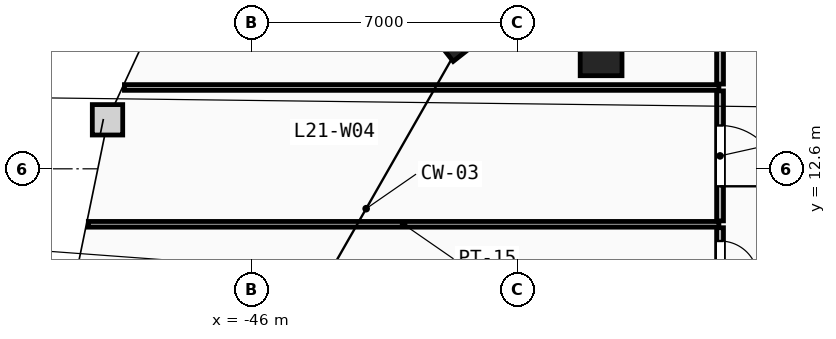
"""IFC4 building model, lengths in metres.
Left out: names, types, materials, properties, quantities, classifications, styles, units other than length and angle.
Written with IfcOpenShell. Run it as: python <this file> out.ifc"""

import sys

from ifc_helpers import new_model, si_unit, direction, frame, frame_2d, origin, origin_2d, place, context, subcontext, project, spatial, rectangle, extrude, element, fill, save


model = new_model("IFC4")
c1 = context("Model", 3, precision=1e-05, world=origin(), true_north=direction((0.0, 1.0)))
c2 = subcontext(c1, "Body", "Model", "MODEL_VIEW")
j1 = project(units=[si_unit("LENGTHUNIT", "METRE"), si_unit("PLANEANGLEUNIT", "RADIAN")], contexts=[c1])
p1 = place(None, origin())
s1 = spatial("IfcSite", under=j1, at=p1, CompositionType="ELEMENT")
p2 = place(p1, origin())
s2 = spatial("IfcBuilding", under=s1, at=p2, CompositionType="ELEMENT")
p3 = place(p2, frame((0.0, 0.0, 85.4)))
s3 = spatial("IfcBuildingStorey", under=s2, at=p3, CompositionType="ELEMENT", Elevation=85.4)
for number, where, z_axis, x_axis in (
    (1, (-36.8, 15.6, 0.0), (0.0, 0.0, 1.0), (1.0, 0.0, 0.0)),
    (2, (-40.6, 16.2, 0.0), (0.0, 0.0, 1.0), (-0.785, -0.619, 0.0)),
):
    element("IfcColumn", number, at=place(p3, frame(where, z_axis=z_axis, x_axis=x_axis)), inside=s3, PredefinedType="COLUMN", context=c2, shape_type="SweptSolid", body=[
        extrude(rectangle(XDim=1.1, YDim=1.1, at=origin_2d()), origin(), (0.0, 0.0, 1.0), 3.6),
    ])
p4 = place(p3, frame((-50.293, 11.14, 0.0), z_axis=(0.0, 0.0, 1.0), x_axis=(1.0, 0.0, 0.0)))
e3 = element("IfcWall", 3, at=p4, inside=s3, PredefinedType="PARTITIONING", context=c2, shape_type="SweptSolid", body=[
    extrude(rectangle(XDim=16.593, YDim=0.15, at=frame_2d((8.296, 0.0))), origin(), (0.0, 0.0, 1.0), 3.3),
])
p5 = place(p3, frame((-49.343, 14.74, 0.0), z_axis=(0.0, 0.0, 1.0), x_axis=(1.0, 0.0, 0.0)))
e4 = element("IfcWall", 4, at=p5, inside=s3, PredefinedType="PARTITIONING", context=c2, shape_type="SweptSolid", body=[
    extrude(rectangle(XDim=15.643, YDim=0.15, at=frame_2d((7.822, 0.0))), origin(), (0.0, 0.0, 1.0), 3.3),
])
p6 = place(p3, frame((-33.67, 17.428, 0.0), z_axis=(0.0, 0.0, 1.0), x_axis=(0.0, -1.0, 0.0)))
e5 = element("IfcWall", 5, at=p6, inside=s3, PredefinedType="PARTITIONING", context=c2, shape_type="SweptSolid", body=[
    extrude(rectangle(XDim=2.598, YDim=0.18, at=frame_2d((1.299, 0.0))), origin(), (0.0, 0.0, 1.0), 3.3),
])
p7 = place(p3, frame((-33.67, 11.05, 0.0), z_axis=(0.0, 0.0, 1.0), x_axis=(0.0, -1.0, 0.0)))
e6 = element("IfcWall", 6, at=p7, inside=s3, PredefinedType="PARTITIONING", context=c2, shape_type="SweptSolid", body=[
    extrude(rectangle(XDim=1.699, YDim=0.18, at=frame_2d((0.849, 0.0))), origin(), (0.0, 0.0, 1.0), 3.3),
])
p8 = place(p7, frame((0.349, 0.0, 0.0)))
e7 = element("IfcOpeningElement", 7, at=p8, cuts=e6, PredefinedType="OPENING", context=c2, shape_type="SweptSolid", body=[
    extrude(rectangle(XDim=1.0, YDim=2.15, at=frame_2d((0.5, 1.075))), frame((0.0, 0.1, 0.0), z_axis=(0.0, -1.0, 0.0), x_axis=(1.0, 0.0, 0.0)), (0.0, 0.0, 1.0), 0.2),
])
p9 = place(p3, frame((-33.67, 14.65, 0.0), z_axis=(0.0, 0.0, 1.0), x_axis=(0.0, -1.0, 0.0)))
e8 = element("IfcWall", 8, at=p9, inside=s3, PredefinedType="PARTITIONING", context=c2, shape_type="SweptSolid", body=[
    extrude(rectangle(XDim=3.42, YDim=0.18, at=frame_2d((1.71, 0.0))), origin(), (0.0, 0.0, 1.0), 3.3),
])
p10 = place(p9, frame((0.91, 0.0, 0.0)))
e9 = element("IfcOpeningElement", 9, at=p10, cuts=e8, PredefinedType="OPENING", context=c2, shape_type="SweptSolid", body=[
    extrude(rectangle(XDim=1.6, YDim=2.2, at=frame_2d((0.8, 1.1))), frame((0.0, 0.1, 0.0), z_axis=(0.0, -1.0, 0.0), x_axis=(1.0, 0.0, 0.0)), (0.0, 0.0, 1.0), 0.2),
])
p11 = place(p10, origin())
e10 = element("IfcDoor", 10, at=p11, inside=s3, OperationType="SINGLE_SWING_RIGHT", PredefinedType="DOOR", context=c2, shape_type="SweptSolid", body=[
    extrude(rectangle(XDim=1.6, YDim=2.2, at=frame_2d((0.8, 1.1))), frame((0.0, 0.025, 0.0), z_axis=(0.0, -1.0, 0.0), x_axis=(1.0, 0.0, 0.0)), (0.0, 0.0, 1.0), 0.05),
])
fill(e9, e10)
p12 = place(p8, origin())
e11 = element("IfcDoor", 11, at=p12, inside=s3, OperationType="SINGLE_SWING_RIGHT", PredefinedType="DOOR", context=c2, shape_type="SweptSolid", body=[
    extrude(rectangle(XDim=1.0, YDim=2.15, at=frame_2d((0.5, 1.075))), frame((0.0, 0.025, 0.0), z_axis=(0.0, -1.0, 0.0), x_axis=(1.0, 0.0, 0.0)), (0.0, 0.0, 1.0), 0.05),
])
fill(e7, e11)
save(model, sys.argv[1])
